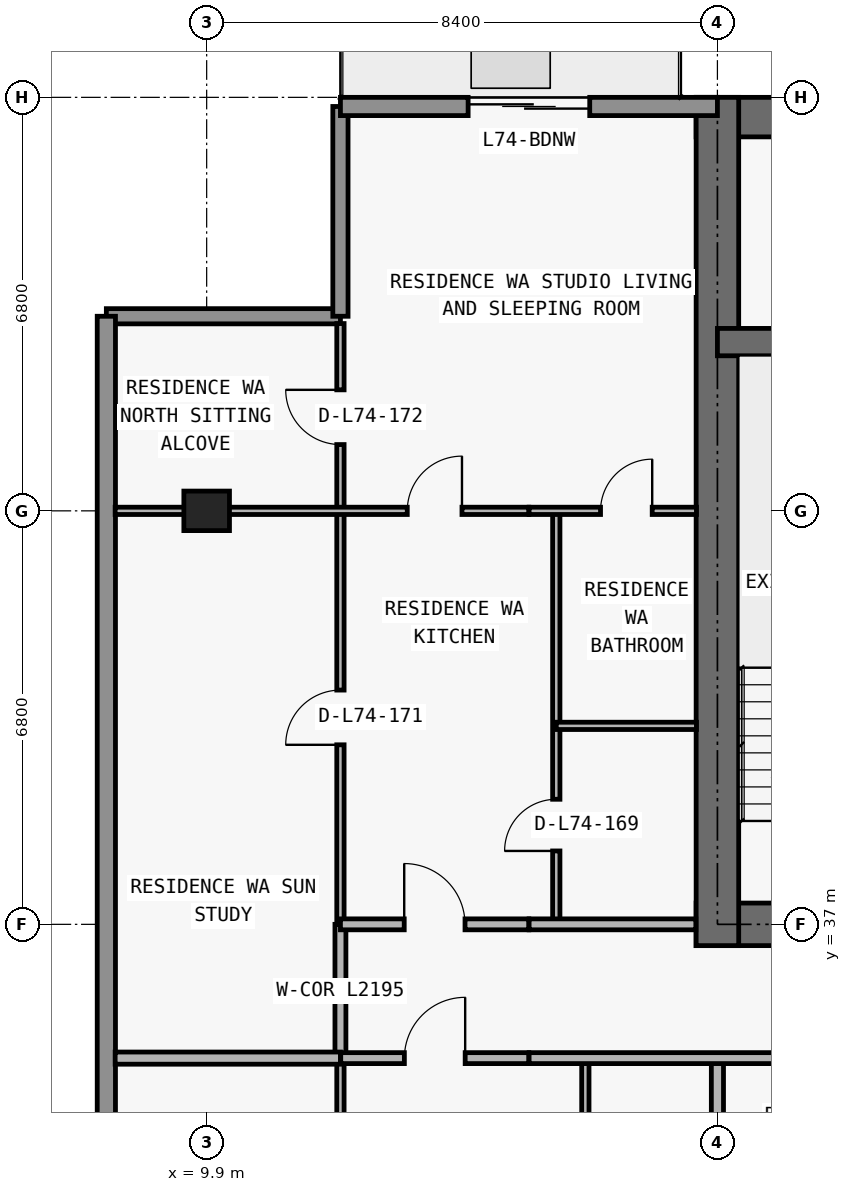
"""IFC4 building model, lengths in metres.
Left out: names, types, materials, properties, quantities, classifications, styles, units other than length and angle.
Written with IfcOpenShell. Run it as: python <this file> out.ifc"""

import sys

from ifc_helpers import new_model, si_unit, direction, frame, frame_2d, origin, origin_2d, place, context, subcontext, project, spatial, rectangle, extrude, element, fill, save


model = new_model("IFC4")
c1 = context("Model", 3, precision=1e-05, world=origin(), true_north=direction((0.0, 1.0)))
c2 = subcontext(c1, "Body", "Model", "MODEL_VIEW")
j1 = project(units=[si_unit("LENGTHUNIT", "METRE"), si_unit("PLANEANGLEUNIT", "RADIAN")], contexts=[c1])
p1 = place(None, origin())
s1 = spatial("IfcSite", under=j1, at=p1, CompositionType="ELEMENT")
p2 = place(p1, origin())
s2 = spatial("IfcBuilding", under=s1, at=p2, CompositionType="ELEMENT")
p3 = place(p2, frame((0.0, 0.0, 262.8)))
s3 = spatial("IfcBuildingStorey", under=s2, at=p3, CompositionType="ELEMENT", Elevation=262.8)
p4 = place(p3, frame((9.9, 43.8, 0.0), z_axis=(0.0, 0.0, 1.0), x_axis=(1.0, 0.0, 0.0)))
e1 = element("IfcColumn", 1, at=p4, inside=s3, PredefinedType="COLUMN", context=c2, shape_type="SweptSolid", body=[
    extrude(rectangle(XDim=0.75, YDim=0.65, at=origin_2d()), origin(), (0.0, 0.0, 1.0), 3.05),
])
p5 = place(p3, frame((17.95, 37.0, 0.0), z_axis=(0.0, 0.0, 1.0), x_axis=(1.0, 0.0, 0.0)))
e2 = element("IfcWall", 2, at=p5, inside=s3, PredefinedType="SHEAR", context=c2, shape_type="SweptSolid", body=[
    extrude(rectangle(XDim=41.9, YDim=0.7, at=frame_2d((20.95, 0.0))), origin(), (0.0, 0.0, 1.0), 3.05),
])
p6 = place(p5, frame((14.35, 0.0, 0.0)))
e3 = element("IfcOpeningElement", 3, at=p6, cuts=e2, PredefinedType="OPENING", context=c2, shape_type="SweptSolid", body=[
    extrude(rectangle(XDim=1.1, YDim=2.15, at=frame_2d((0.55, 1.075))), frame((0.0, 0.36, 0.0), z_axis=(0.0, -1.0, 0.0), x_axis=(1.0, 0.0, 0.0)), (0.0, 0.0, 1.0), 0.72),
])
p7 = place(p5, frame((6.2, 0.0, 0.0)))
e4 = element("IfcOpeningElement", 4, at=p7, cuts=e2, PredefinedType="OPENING", context=c2, shape_type="SweptSolid", body=[
    extrude(rectangle(XDim=1.05, YDim=2.15, at=frame_2d((0.525, 1.075))), frame((0.0, 0.36, 0.0), z_axis=(0.0, -1.0, 0.0), x_axis=(1.0, 0.0, 0.0)), (0.0, 0.0, 1.0), 0.72),
])
p8 = place(p5, frame((34.7, 0.0, 0.0)))
e5 = element("IfcOpeningElement", 5, at=p8, cuts=e2, PredefinedType="OPENING", context=c2, shape_type="SweptSolid", body=[
    extrude(rectangle(XDim=1.05, YDim=2.15, at=frame_2d((0.525, 1.075))), frame((0.0, 0.36, 0.0), z_axis=(0.0, -1.0, 0.0), x_axis=(1.0, 0.0, 0.0)), (0.0, 0.0, 1.0), 0.72),
])
p9 = place(p5, frame((10.812, 0.0, 0.0)))
e6 = element("IfcOpeningElement", 6, at=p9, cuts=e2, PredefinedType="OPENING", context=c2, shape_type="SweptSolid", body=[
    extrude(rectangle(XDim=1.05, YDim=2.15, at=frame_2d((0.525, 1.075))), frame((0.0, 0.36, 0.0), z_axis=(0.0, -1.0, 0.0), x_axis=(1.0, 0.0, 0.0)), (0.0, 0.0, 1.0), 0.72),
])
p10 = place(p5, frame((24.05, 0.0, 0.0)))
e7 = element("IfcOpeningElement", 7, at=p10, cuts=e2, PredefinedType="OPENING", context=c2, shape_type="SweptSolid", body=[
    extrude(rectangle(XDim=1.05, YDim=2.15, at=frame_2d((0.525, 1.075))), frame((0.0, 0.36, 0.0), z_axis=(0.0, -1.0, 0.0), x_axis=(1.0, 0.0, 0.0)), (0.0, 0.0, 1.0), 0.72),
])
p11 = place(p3, frame((17.95, 50.275, 0.0), z_axis=(0.0, 0.0, 1.0), x_axis=(1.0, 0.0, 0.0)))
e8 = element("IfcWall", 8, at=p11, inside=s3, PredefinedType="SHEAR", context=c2, shape_type="SweptSolid", body=[
    extrude(rectangle(XDim=41.9, YDim=0.65, at=frame_2d((20.95, 0.0))), origin(), (0.0, 0.0, 1.0), 3.05),
])
p12 = place(p3, frame((18.3, 36.65, 0.0), z_axis=(0.0, 0.0, 1.0), x_axis=(0.0, 1.0, 0.0)))
e9 = element("IfcWall", 9, at=p12, inside=s3, PredefinedType="SHEAR", context=c2, shape_type="SweptSolid", body=[
    extrude(rectangle(XDim=13.95, YDim=0.7, at=frame_2d((6.975, 0.0))), origin(), (0.0, 0.0, 1.0), 3.05),
])
p13 = place(p3, frame((18.3, 46.575, 0.0), z_axis=(0.0, 0.0, 1.0), x_axis=(1.0, 0.0, 0.0)))
e10 = element("IfcWall", 10, at=p13, inside=s3, PredefinedType="SHEAR", context=c2, shape_type="SweptSolid", body=[
    extrude(rectangle(XDim=41.2, YDim=0.45, at=frame_2d((20.6, 0.0))), origin(), (0.0, 0.0, 1.0), 3.05),
])
p14 = place(p13, frame((7.6, 0.0, 0.0)))
e11 = element("IfcOpeningElement", 11, at=p14, cuts=e10, PredefinedType="OPENING", context=c2, shape_type="SweptSolid", body=[
    extrude(rectangle(XDim=1.0, YDim=2.2, at=frame_2d((0.5, 1.1))), frame((0.0, 0.235, 0.0), z_axis=(0.0, -1.0, 0.0), x_axis=(1.0, 0.0, 0.0)), (0.0, 0.0, 1.0), 0.47),
])
p15 = place(p13, frame((32.625, 0.0, 0.0)))
e12 = element("IfcOpeningElement", 12, at=p15, cuts=e10, PredefinedType="OPENING", context=c2, shape_type="SweptSolid", body=[
    extrude(rectangle(XDim=1.05, YDim=2.15, at=frame_2d((0.525, 1.075))), frame((0.0, 0.235, 0.0), z_axis=(0.0, -1.0, 0.0), x_axis=(1.0, 0.0, 0.0)), (0.0, 0.0, 1.0), 0.47),
])
p16 = place(p3, frame((8.25, 47.0, 0.0), z_axis=(0.0, 0.0, 1.0), x_axis=(1.0, 0.0, 0.0)))
e13 = element("IfcWall", 13, at=p16, inside=s3, PredefinedType="ELEMENTEDWALL", context=c2, shape_type="SweptSolid", body=[
    extrude(rectangle(XDim=3.85, YDim=0.25, at=frame_2d((1.925, 0.0))), origin(), (0.0, 0.0, 1.0), 3.05),
])
p17 = place(p3, frame((12.1, 47.0, 0.0), z_axis=(0.0, 0.0, 1.0), x_axis=(0.0, 1.0, 0.0)))
e14 = element("IfcWall", 14, at=p17, inside=s3, PredefinedType="ELEMENTEDWALL", context=c2, shape_type="SweptSolid", body=[
    extrude(rectangle(XDim=3.45, YDim=0.25, at=frame_2d((1.725, 0.0))), origin(), (0.0, 0.0, 1.0), 3.05),
])
p18 = place(p3, frame((8.25, 30.15, 0.0), z_axis=(0.0, 0.0, 1.0), x_axis=(0.0, 1.0, 0.0)))
e15 = element("IfcWall", 15, at=p18, inside=s3, PredefinedType="STANDARD", context=c2, shape_type="SweptSolid", body=[
    extrude(rectangle(XDim=16.85, YDim=0.3, at=frame_2d((8.425, 0.0))), origin(), (0.0, 0.0, 1.0), 3.05),
])
p19 = place(p3, frame((12.1, 50.45, 0.0), z_axis=(0.0, 0.0, 1.0), x_axis=(1.0, 0.0, 0.0)))
e16 = element("IfcWall", 16, at=p19, inside=s3, PredefinedType="STANDARD", context=c2, shape_type="SweptSolid", body=[
    extrude(rectangle(XDim=6.2, YDim=0.3, at=frame_2d((3.1, 0.0))), origin(), (0.0, 0.0, 1.0), 3.05),
])
p20 = place(p19, frame((2.1, 0.0, 0.0)))
e17 = element("IfcOpeningElement", 17, at=p20, cuts=e16, PredefinedType="OPENING", context=c2, shape_type="SweptSolid", body=[
    extrude(rectangle(XDim=2.0, YDim=2.3, at=frame_2d((1.0, 1.15))), frame((0.0, 0.16, 0.0), z_axis=(0.0, -1.0, 0.0), x_axis=(1.0, 0.0, 0.0)), (0.0, 0.0, 1.0), 0.32),
])
p21 = place(p3, frame((12.1, 30.84, 0.0), z_axis=(0.0, 0.0, 1.0), x_axis=(0.0, 1.0, 0.0)))
e18 = element("IfcWall", 18, at=p21, inside=s3, PredefinedType="PARTITIONING", context=c2, shape_type="SweptSolid", body=[
    extrude(rectangle(XDim=3.96, YDim=0.12, at=frame_2d((1.98, 0.0))), origin(), (0.0, 0.0, 1.0), 2.578),
])
p22 = place(p3, frame((12.1, 34.805, 0.0), z_axis=(0.0, 0.0, 1.0), x_axis=(0.0, 1.0, 0.0)))
e19 = element("IfcWall", 19, at=p22, inside=s3, PredefinedType="PARTITIONING", context=c2, shape_type="SweptSolid", body=[
    extrude(rectangle(XDim=2.195, YDim=0.18, at=frame_2d((1.098, 0.0))), origin(), (0.0, 0.0, 1.0), 2.578),
])
p23 = place(p3, frame((12.1, 37.005, 0.0), z_axis=(0.0, 0.0, 1.0), x_axis=(0.0, 1.0, 0.0)))
e20 = element("IfcWall", 20, at=p23, inside=s3, PredefinedType="PARTITIONING", context=c2, shape_type="SweptSolid", body=[
    extrude(rectangle(XDim=9.875, YDim=0.12, at=frame_2d((4.938, 0.0))), origin(), (0.0, 0.0, 1.0), 2.578),
])
p24 = place(p23, frame((2.948, 0.0, 0.0)))
e21 = element("IfcOpeningElement", 21, at=p24, cuts=e20, PredefinedType="OPENING", context=c2, shape_type="SweptSolid", body=[
    extrude(rectangle(XDim=0.9, YDim=2.15, at=frame_2d((0.45, 1.075))), frame((0.0, 0.07, 0.0), z_axis=(0.0, -1.0, 0.0), x_axis=(1.0, 0.0, 0.0)), (0.0, 0.0, 1.0), 0.14),
])
p25 = place(p23, frame((7.885, 0.0, 0.0)))
e22 = element("IfcOpeningElement", 22, at=p25, cuts=e20, PredefinedType="OPENING", context=c2, shape_type="SweptSolid", body=[
    extrude(rectangle(XDim=0.9, YDim=2.15, at=frame_2d((0.45, 1.075))), frame((0.0, 0.07, 0.0), z_axis=(0.0, -1.0, 0.0), x_axis=(1.0, 0.0, 0.0)), (0.0, 0.0, 1.0), 0.14),
])
p26 = place(p3, frame((15.65, 37.0, 0.0), z_axis=(0.0, 0.0, 1.0), x_axis=(0.0, 1.0, 0.0)))
e23 = element("IfcWall", 23, at=p26, inside=s3, PredefinedType="PARTITIONING", context=c2, shape_type="SweptSolid", body=[
    extrude(rectangle(XDim=6.8, YDim=0.12, at=frame_2d((3.4, 0.0))), origin(), (0.0, 0.0, 1.0), 3.05),
])
p27 = place(p26, frame((1.207, 0.0, 0.0)))
e24 = element("IfcOpeningElement", 24, at=p27, cuts=e23, PredefinedType="OPENING", context=c2, shape_type="SweptSolid", body=[
    extrude(rectangle(XDim=0.85, YDim=2.1, at=frame_2d((0.425, 1.05))), frame((0.0, 0.07, 0.0), z_axis=(0.0, -1.0, 0.0), x_axis=(1.0, 0.0, 0.0)), (0.0, 0.0, 1.0), 0.14),
])
p28 = place(p3, frame((16.128, 30.84, 0.0), z_axis=(0.0, 0.0, 1.0), x_axis=(0.0, 1.0, 0.0)))
e25 = element("IfcWall", 25, at=p28, inside=s3, PredefinedType="PARTITIONING", context=c2, shape_type="SweptSolid", body=[
    extrude(rectangle(XDim=3.96, YDim=0.12, at=frame_2d((1.98, 0.0))), origin(), (0.0, 0.0, 1.0), 2.629),
])
p29 = place(p28, frame((1.555, 0.0, 0.0)))
e26 = element("IfcOpeningElement", 26, at=p29, cuts=e25, PredefinedType="OPENING", context=c2, shape_type="SweptSolid", body=[
    extrude(rectangle(XDim=0.85, YDim=2.1, at=frame_2d((0.425, 1.05))), frame((0.0, 0.07, 0.0), z_axis=(0.0, -1.0, 0.0), x_axis=(1.0, 0.0, 0.0)), (0.0, 0.0, 1.0), 0.14),
])
p30 = place(p3, frame((18.3, 30.84, 0.0), z_axis=(0.0, 0.0, 1.0), x_axis=(0.0, 1.0, 0.0)))
e27 = element("IfcWall", 27, at=p30, inside=s3, PredefinedType="PARTITIONING", context=c2, shape_type="SweptSolid", body=[
    extrude(rectangle(XDim=3.96, YDim=0.2, at=frame_2d((1.98, 0.0))), origin(), (0.0, 0.0, 1.0), 2.263),
])
p31 = place(p3, frame((8.395, 34.8, 0.0), z_axis=(0.0, 0.0, 1.0), x_axis=(1.0, 0.0, 0.0)))
e28 = element("IfcWall", 28, at=p31, inside=s3, PredefinedType="PARTITIONING", context=c2, shape_type="SweptSolid", body=[
    extrude(rectangle(XDim=3.705, YDim=0.2, at=frame_2d((1.853, 0.0))), origin(), (0.0, 0.0, 1.0), 3.05),
])
p32 = place(p3, frame((12.105, 34.8, 0.0), z_axis=(0.0, 0.0, 1.0), x_axis=(1.0, 0.0, 0.0)))
e29 = element("IfcWall", 29, at=p32, inside=s3, PredefinedType="PARTITIONING", context=c2, shape_type="SweptSolid", body=[
    extrude(rectangle(XDim=3.093, YDim=0.18, at=frame_2d((1.546, 0.0))), origin(), (0.0, 0.0, 1.0), 3.05),
])
p33 = place(p32, frame((1.046, 0.0, 0.0)))
e30 = element("IfcOpeningElement", 30, at=p33, cuts=e29, PredefinedType="OPENING", context=c2, shape_type="SweptSolid", body=[
    extrude(rectangle(XDim=1.0, YDim=2.2, at=frame_2d((0.5, 1.1))), frame((0.0, 0.1, 0.0), z_axis=(0.0, -1.0, 0.0), x_axis=(1.0, 0.0, 0.0)), (0.0, 0.0, 1.0), 0.2),
])
p34 = place(p3, frame((15.203, 34.8, 0.0), z_axis=(0.0, 0.0, 1.0), x_axis=(1.0, 0.0, 0.0)))
e31 = element("IfcWall", 31, at=p34, inside=s3, PredefinedType="PARTITIONING", context=c2, shape_type="SweptSolid", body=[
    extrude(rectangle(XDim=16.283, YDim=0.18, at=frame_2d((8.142, 0.0))), origin(), (0.0, 0.0, 1.0), 3.05),
])
p35 = place(p34, frame((5.516, 0.0, 0.0)))
e32 = element("IfcOpeningElement", 32, at=p35, cuts=e31, PredefinedType="OPENING", context=c2, shape_type="SweptSolid", body=[
    extrude(rectangle(XDim=1.0, YDim=2.2, at=frame_2d((0.5, 1.1))), frame((0.0, 0.1, 0.0), z_axis=(0.0, -1.0, 0.0), x_axis=(1.0, 0.0, 0.0)), (0.0, 0.0, 1.0), 0.2),
])
p36 = place(p34, frame((13.39, 0.0, 0.0)))
e33 = element("IfcOpeningElement", 33, at=p36, cuts=e31, PredefinedType="OPENING", context=c2, shape_type="SweptSolid", body=[
    extrude(rectangle(XDim=1.0, YDim=2.2, at=frame_2d((0.5, 1.1))), frame((0.0, 0.1, 0.0), z_axis=(0.0, -1.0, 0.0), x_axis=(1.0, 0.0, 0.0)), (0.0, 0.0, 1.0), 0.2),
])
p37 = place(p3, frame((12.1, 37.0, 0.0), z_axis=(0.0, 0.0, 1.0), x_axis=(1.0, 0.0, 0.0)))
e34 = element("IfcWall", 34, at=p37, inside=s3, PredefinedType="PARTITIONING", context=c2, shape_type="SweptSolid", body=[
    extrude(rectangle(XDim=3.098, YDim=0.18, at=frame_2d((1.549, 0.0))), origin(), (0.0, 0.0, 1.0), 3.05),
])
p38 = place(p37, frame((1.049, 0.0, 0.0)))
e35 = element("IfcOpeningElement", 35, at=p38, cuts=e34, PredefinedType="OPENING", context=c2, shape_type="SweptSolid", body=[
    extrude(rectangle(XDim=1.0, YDim=2.2, at=frame_2d((0.5, 1.1))), frame((0.0, 0.1, 0.0), z_axis=(0.0, -1.0, 0.0), x_axis=(1.0, 0.0, 0.0)), (0.0, 0.0, 1.0), 0.2),
])
p39 = place(p3, frame((15.203, 37.0, 0.0), z_axis=(0.0, 0.0, 1.0), x_axis=(1.0, 0.0, 0.0)))
e36 = element("IfcWall", 36, at=p39, inside=s3, PredefinedType="PARTITIONING", context=c2, shape_type="SweptSolid", body=[
    extrude(rectangle(XDim=2.742, YDim=0.18, at=frame_2d((1.371, 0.0))), origin(), (0.0, 0.0, 1.0), 3.05),
])
p40 = place(p3, frame((15.65, 40.264, 0.0), z_axis=(0.0, 0.0, 1.0), x_axis=(1.0, 0.0, 0.0)))
e37 = element("IfcWall", 37, at=p40, inside=s3, PredefinedType="PARTITIONING", context=c2, shape_type="SweptSolid", body=[
    extrude(rectangle(XDim=2.305, YDim=0.12, at=frame_2d((1.153, 0.0))), origin(), (0.0, 0.0, 1.0), 3.05),
])
p41 = place(p3, frame((8.395, 43.8, 0.0), z_axis=(0.0, 0.0, 1.0), x_axis=(1.0, 0.0, 0.0)))
e38 = element("IfcWall", 38, at=p41, inside=s3, PredefinedType="PARTITIONING", context=c2, shape_type="SweptSolid", body=[
    extrude(rectangle(XDim=6.803, YDim=0.12, at=frame_2d((3.401, 0.0))), origin(), (0.0, 0.0, 1.0), 2.418),
])
p42 = place(p41, frame((4.804, 0.0, 0.0)))
e39 = element("IfcOpeningElement", 39, at=p42, cuts=e38, PredefinedType="OPENING", context=c2, shape_type="SweptSolid", body=[
    extrude(rectangle(XDim=0.9, YDim=2.15, at=frame_2d((0.45, 1.075))), frame((0.0, 0.07, 0.0), z_axis=(0.0, -1.0, 0.0), x_axis=(1.0, 0.0, 0.0)), (0.0, 0.0, 1.0), 0.14),
])
p43 = place(p3, frame((15.203, 43.8, 0.0), z_axis=(0.0, 0.0, 1.0), x_axis=(1.0, 0.0, 0.0)))
e40 = element("IfcWall", 40, at=p43, inside=s3, PredefinedType="PARTITIONING", context=c2, shape_type="SweptSolid", body=[
    extrude(rectangle(XDim=2.752, YDim=0.12, at=frame_2d((1.376, 0.0))), origin(), (0.0, 0.0, 1.0), 2.418),
])
p44 = place(p43, frame((1.175, 0.0, 0.0)))
e41 = element("IfcOpeningElement", 41, at=p44, cuts=e40, PredefinedType="OPENING", context=c2, shape_type="SweptSolid", body=[
    extrude(rectangle(XDim=0.85, YDim=2.1, at=frame_2d((0.425, 1.05))), frame((0.0, 0.07, 0.0), z_axis=(0.0, -1.0, 0.0), x_axis=(1.0, 0.0, 0.0)), (0.0, 0.0, 1.0), 0.14),
])
p45 = place(p20, origin())
e42 = element("IfcDoor", 42, at=p45, inside=s3, OperationType="DOUBLE_DOOR_SLIDING", PredefinedType="DOOR", context=c2, shape_type="SweptSolid", body=[
    extrude(rectangle(XDim=2.0, YDim=2.3, at=frame_2d((1.0, 1.15))), frame((0.0, 0.025, 0.0), z_axis=(0.0, -1.0, 0.0), x_axis=(1.0, 0.0, 0.0)), (0.0, 0.0, 1.0), 0.05),
])
fill(e17, e42)
p46 = place(p33, origin())
e43 = element("IfcDoor", 43, at=p46, inside=s3, OperationType="SINGLE_SWING_RIGHT", PredefinedType="DOOR", context=c2, shape_type="SweptSolid", body=[
    extrude(rectangle(XDim=1.0, YDim=2.2, at=frame_2d((0.5, 1.1))), frame((0.0, 0.025, 0.0), z_axis=(0.0, -1.0, 0.0), x_axis=(1.0, 0.0, 0.0)), (0.0, 0.0, 1.0), 0.05),
])
fill(e30, e43)
p47 = place(p38, origin())
e44 = element("IfcDoor", 44, at=p47, inside=s3, OperationType="SINGLE_SWING_LEFT", PredefinedType="DOOR", context=c2, shape_type="SweptSolid", body=[
    extrude(rectangle(XDim=1.0, YDim=2.2, at=frame_2d((0.5, 1.1))), frame((0.0, 0.025, 0.0), z_axis=(0.0, -1.0, 0.0), x_axis=(1.0, 0.0, 0.0)), (0.0, 0.0, 1.0), 0.05),
])
fill(e35, e44)
p48 = place(p42, origin())
e45 = element("IfcDoor", 45, at=p48, inside=s3, OperationType="SINGLE_SWING_RIGHT", PredefinedType="DOOR", context=c2, shape_type="SweptSolid", body=[
    extrude(rectangle(XDim=0.9, YDim=2.15, at=frame_2d((0.45, 1.075))), frame((0.0, 0.025, 0.0), z_axis=(0.0, -1.0, 0.0), x_axis=(1.0, 0.0, 0.0)), (0.0, 0.0, 1.0), 0.05),
])
fill(e39, e45)
p49 = place(p27, origin())
e46 = element("IfcDoor", 46, at=p49, inside=s3, OperationType="SINGLE_SWING_LEFT", PredefinedType="DOOR", context=c2, shape_type="SweptSolid", body=[
    extrude(rectangle(XDim=0.85, YDim=2.1, at=frame_2d((0.425, 1.05))), frame((0.0, 0.025, 0.0), z_axis=(0.0, -1.0, 0.0), x_axis=(1.0, 0.0, 0.0)), (0.0, 0.0, 1.0), 0.05),
])
fill(e24, e46)
p50 = place(p44, origin())
e47 = element("IfcDoor", 47, at=p50, inside=s3, OperationType="SINGLE_SWING_RIGHT", PredefinedType="DOOR", context=c2, shape_type="SweptSolid", body=[
    extrude(rectangle(XDim=0.85, YDim=2.1, at=frame_2d((0.425, 1.05))), frame((0.0, 0.025, 0.0), z_axis=(0.0, -1.0, 0.0), x_axis=(1.0, 0.0, 0.0)), (0.0, 0.0, 1.0), 0.05),
])
fill(e41, e47)
p51 = place(p24, origin())
e48 = element("IfcDoor", 48, at=p51, inside=s3, OperationType="SINGLE_SWING_LEFT", PredefinedType="DOOR", context=c2, shape_type="SweptSolid", body=[
    extrude(rectangle(XDim=0.9, YDim=2.15, at=frame_2d((0.45, 1.075))), frame((0.0, 0.025, 0.0), z_axis=(0.0, -1.0, 0.0), x_axis=(1.0, 0.0, 0.0)), (0.0, 0.0, 1.0), 0.05),
])
fill(e21, e48)
p52 = place(p25, origin())
e49 = element("IfcDoor", 49, at=p52, inside=s3, OperationType="SINGLE_SWING_RIGHT", PredefinedType="DOOR", context=c2, shape_type="SweptSolid", body=[
    extrude(rectangle(XDim=0.9, YDim=2.15, at=frame_2d((0.45, 1.075))), frame((0.0, 0.025, 0.0), z_axis=(0.0, -1.0, 0.0), x_axis=(1.0, 0.0, 0.0)), (0.0, 0.0, 1.0), 0.05),
])
fill(e22, e49)
save(model, sys.argv[1])
